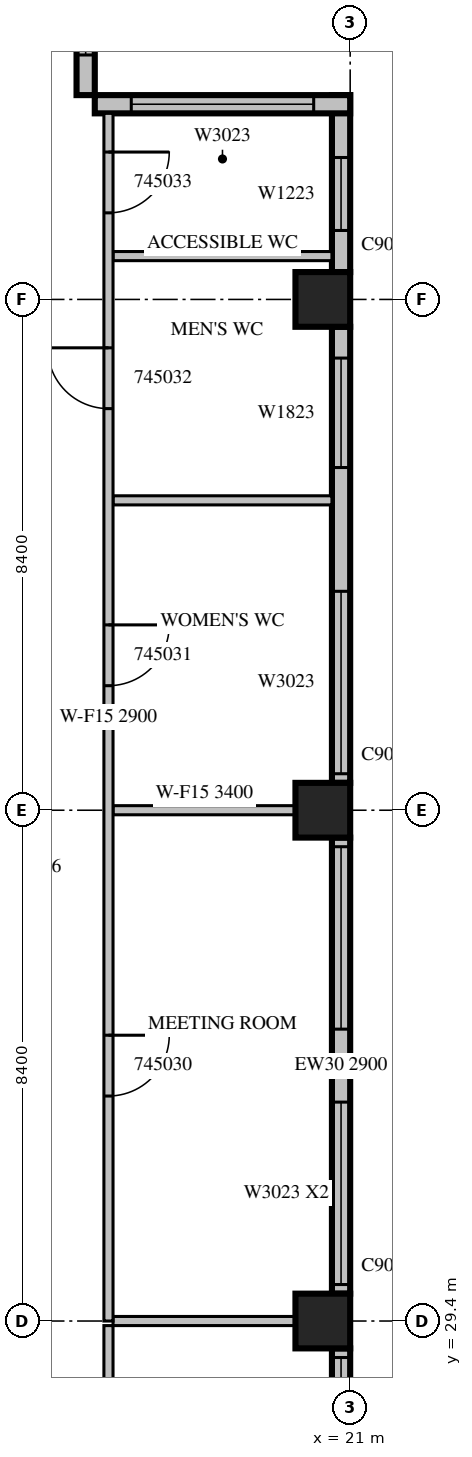
"""IFC4 building model, lengths in metres.
Left out: names, types, materials, properties, quantities, classifications, styles, units other than length and angle.
Written with IfcOpenShell. Run it as: python <this file> out.ifc"""

import sys

from ifc_helpers import new_model, si_unit, direction, frame, frame_2d, origin, origin_2d, place, context, subcontext, project, spatial, rectangle, extrude, source, transform, mapped, element, fill, save


model = new_model("IFC4")
c1 = context("Model", 3, precision=1e-05, world=origin(), true_north=direction((0.0, 1.0)))
c2 = subcontext(c1, "Body", "Model", "MODEL_VIEW")
j1 = project(units=[si_unit("LENGTHUNIT", "METRE"), si_unit("PLANEANGLEUNIT", "RADIAN")], contexts=[c1])
p1 = place(None, origin())
s1 = spatial("IfcSite", under=j1, at=p1, CompositionType="ELEMENT")
p2 = place(p1, origin())
s2 = spatial("IfcBuilding", under=s1, at=p2, CompositionType="ELEMENT")
p3 = place(p2, frame((0.0, 0.0, 204.4)))
s3 = spatial("IfcBuildingStorey", under=s2, at=p3, CompositionType="ELEMENT", Elevation=204.4)
m1 = source(origin(), c2, "Body", "SweptSolid", [
    extrude(rectangle(XDim=0.9, YDim=0.9, at=origin_2d()), origin(), (0.0, 0.0, 1.0), 3.8),
])
for number, where, z_axis, x_axis in (
    (1, (20.55, 29.4, 0.0), (0.0, 0.0, 1.0), (1.0, 0.0, 0.0)),
    (2, (20.55, 37.8, 0.0), (0.0, 0.0, 1.0), (1.0, 0.0, 0.0)),
    (3, (20.55, 46.2, 0.0), (0.0, 0.0, 1.0), (1.0, 0.0, 0.0)),
):
    element("IfcColumn", number, at=place(p3, frame(where, z_axis=z_axis, x_axis=x_axis)), inside=s3, PredefinedType="COLUMN", context=c2, shape_type="MappedRepresentation", body=[
        mapped(m1, transform((0.0, 0.0, 0.0), scale=1.0)),
    ])
m2 = source(origin(), c2, "Body", "SweptSolid", [
    extrude(rectangle(XDim=7.15, YDim=0.3, at=frame_2d((3.575, 0.0))), origin(), (0.0, 0.0, 1.0), 3.4),
])
p4 = place(p3, frame((20.85, 21.8, 0.0), z_axis=(0.0, 0.0, 1.0), x_axis=(0.0, 1.0, 0.0)))
e4 = element("IfcWall", 4, at=p4, inside=s3, PredefinedType="STANDARD", context=c2, shape_type="MappedRepresentation", body=[
    mapped(m2, transform((0.0, 0.0, 0.0), scale=1.0)),
])
m3 = source(origin(), c2, "Body", "SweptSolid", [
    extrude(rectangle(XDim=1.8, YDim=2.3, at=frame_2d((0.9, 1.15))), frame((0.0, 0.16, 0.0), z_axis=(0.0, -1.0, 0.0), x_axis=(1.0, 0.0, 0.0)), (0.0, 0.0, 1.0), 0.32),
])
p5 = place(p4, frame((0.4, 0.0, 0.6)))
e5 = element("IfcOpeningElement", 5, at=p5, cuts=e4, PredefinedType="OPENING", context=c2, shape_type="MappedRepresentation", body=[
    mapped(m3, transform((0.0, 0.0, 0.0), scale=1.0)),
])
m4 = source(origin(), c2, "Body", "SweptSolid", [
    extrude(rectangle(XDim=3.0, YDim=2.3, at=frame_2d((1.5, 1.15))), frame((0.0, 0.16, 0.0), z_axis=(0.0, -1.0, 0.0), x_axis=(1.0, 0.0, 0.0)), (0.0, 0.0, 1.0), 0.32),
])
p6 = place(p4, frame((4.0, 0.0, 0.6)))
e6 = element("IfcOpeningElement", 6, at=p6, cuts=e4, PredefinedType="OPENING", context=c2, shape_type="MappedRepresentation", body=[
    mapped(m4, transform((0.0, 0.0, 0.0), scale=1.0)),
])
m5 = source(origin(), c2, "Body", "SweptSolid", [
    extrude(rectangle(XDim=7.5, YDim=0.3, at=frame_2d((3.75, 0.0))), origin(), (0.0, 0.0, 1.0), 2.9),
])
p7 = place(p3, frame((20.85, 29.85, 0.0), z_axis=(0.0, 0.0, 1.0), x_axis=(0.0, 1.0, 0.0)))
e7 = element("IfcWall", 7, at=p7, inside=s3, PredefinedType="STANDARD", context=c2, shape_type="MappedRepresentation", body=[
    mapped(m5, transform((0.0, 0.0, 0.0), scale=1.0)),
])
p8 = place(p7, frame((0.15, 0.0, 0.6)))
e8 = element("IfcOpeningElement", 8, at=p8, cuts=e7, PredefinedType="OPENING", context=c2, shape_type="MappedRepresentation", body=[
    mapped(m4, transform((0.0, 0.0, 0.0), scale=1.0)),
])
p9 = place(p7, frame((4.35, 0.0, 0.6)))
e9 = element("IfcOpeningElement", 9, at=p9, cuts=e7, PredefinedType="OPENING", context=c2, shape_type="MappedRepresentation", body=[
    mapped(m4, transform((0.0, 0.0, 0.0), scale=1.0)),
])
m6 = source(origin(), c2, "Body", "SweptSolid", [
    extrude(rectangle(XDim=7.5, YDim=0.3, at=frame_2d((3.75, 0.0))), origin(), (0.0, 0.0, 1.0), 3.4),
])
p10 = place(p3, frame((20.85, 38.25, 0.0), z_axis=(0.0, 0.0, 1.0), x_axis=(0.0, 1.0, 0.0)))
e10 = element("IfcWall", 10, at=p10, inside=s3, PredefinedType="STANDARD", context=c2, shape_type="MappedRepresentation", body=[
    mapped(m6, transform((0.0, 0.0, 0.0), scale=1.0)),
])
p11 = place(p10, frame((0.15, 0.0, 0.6)))
e11 = element("IfcOpeningElement", 11, at=p11, cuts=e10, PredefinedType="OPENING", context=c2, shape_type="MappedRepresentation", body=[
    mapped(m4, transform((0.0, 0.0, 0.0), scale=1.0)),
])
p12 = place(p10, frame((5.186, 0.0, 0.6)))
e12 = element("IfcOpeningElement", 12, at=p12, cuts=e10, PredefinedType="OPENING", context=c2, shape_type="MappedRepresentation", body=[
    mapped(m3, transform((0.0, 0.0, 0.0), scale=1.0)),
])
m7 = source(origin(), c2, "Body", "SweptSolid", [
    extrude(rectangle(XDim=2.91, YDim=0.3, at=frame_2d((1.455, 0.0))), origin(), (0.0, 0.0, 1.0), 3.4),
])
p13 = place(p3, frame((20.85, 46.65, 0.0), z_axis=(0.0, 0.0, 1.0), x_axis=(0.0, 1.0, 0.0)))
e13 = element("IfcWall", 13, at=p13, inside=s3, PredefinedType="STANDARD", context=c2, shape_type="MappedRepresentation", body=[
    mapped(m7, transform((0.0, 0.0, 0.0), scale=1.0)),
])
m8 = source(origin(), c2, "Body", "SweptSolid", [
    extrude(rectangle(XDim=1.2, YDim=2.3, at=frame_2d((0.6, 1.15))), frame((0.0, 0.16, 0.0), z_axis=(0.0, -1.0, 0.0), x_axis=(1.0, 0.0, 0.0)), (0.0, 0.0, 1.0), 0.32),
])
p14 = place(p13, frame((0.684, 0.0, 0.6)))
e14 = element("IfcOpeningElement", 14, at=p14, cuts=e13, PredefinedType="OPENING", context=c2, shape_type="MappedRepresentation", body=[
    mapped(m8, transform((0.0, 0.0, 0.0), scale=1.0)),
])
m9 = source(origin(), c2, "Body", "SweptSolid", [
    extrude(rectangle(XDim=4.2, YDim=0.3, at=frame_2d((2.1, 0.0))), origin(), (0.0, 0.0, 1.0), 3.4),
])
p15 = place(p3, frame((21.0, 49.41, 0.0), z_axis=(0.0, 0.0, 1.0), x_axis=(-1.0, 0.0, 0.0)))
e15 = element("IfcWall", 15, at=p15, inside=s3, PredefinedType="STANDARD", context=c2, shape_type="MappedRepresentation", body=[
    mapped(m9, transform((0.0, 0.0, 0.0), scale=1.0)),
])
p16 = place(p15, frame((0.6, 0.0, 0.6)))
e16 = element("IfcOpeningElement", 16, at=p16, cuts=e15, PredefinedType="OPENING", context=c2, shape_type="MappedRepresentation", body=[
    mapped(m4, transform((0.0, 0.0, 0.0), scale=1.0)),
])
m10 = source(origin(), c2, "Body", "SweptSolid", [
    extrude(rectangle(XDim=2.52, YDim=0.3, at=frame_2d((1.26, 0.0))), origin(), (0.0, 0.0, 1.0), 3.4),
])
p17 = place(p3, frame((16.65, 49.56, 0.0), z_axis=(0.0, 0.0, 1.0), x_axis=(0.0, 1.0, 0.0)))
e17 = element("IfcWall", 17, at=p17, inside=s3, PredefinedType="STANDARD", context=c2, shape_type="MappedRepresentation", body=[
    mapped(m10, transform((0.0, 0.0, 0.0), scale=1.0)),
])
p18 = place(p17, frame((0.66, 0.0, 0.6)))
e18 = element("IfcOpeningElement", 18, at=p18, cuts=e17, PredefinedType="OPENING", context=c2, shape_type="MappedRepresentation", body=[
    mapped(m8, transform((0.0, 0.0, 0.0), scale=1.0)),
])
m11 = source(origin(), c2, "Body", "SweptSolid", [
    extrude(rectangle(XDim=4.85, YDim=0.15, at=frame_2d((2.425, 0.0))), origin(), (0.0, 0.0, 1.0), 3.4),
])
p19 = place(p3, frame((17.025, 29.325, 0.0), z_axis=(0.0, 0.0, 1.0), x_axis=(0.0, -1.0, 0.0)))
e19 = element("IfcWall", 19, at=p19, inside=s3, PredefinedType="PARTITIONING", context=c2, shape_type="MappedRepresentation", body=[
    mapped(m11, transform((0.0, 0.0, 0.0), scale=1.0)),
])
m12 = source(origin(), c2, "Body", "SweptSolid", [
    extrude(rectangle(XDim=3.001, YDim=0.15, at=frame_2d((1.5, 0.0))), origin(), (0.0, 0.0, 1.0), 3.4),
])
p20 = place(p3, frame((20.101, 29.4, 0.0), z_axis=(0.0, 0.0, 1.0), x_axis=(-1.0, 0.0, 0.0)))
e20 = element("IfcWall", 20, at=p20, inside=s3, PredefinedType="PARTITIONING", context=c2, shape_type="MappedRepresentation", body=[
    mapped(m12, transform((0.0, 0.0, 0.0), scale=1.0)),
])
m13 = source(origin(), c2, "Body", "SweptSolid", [
    extrude(rectangle(XDim=3.6, YDim=0.15, at=frame_2d((1.8, 0.0))), origin(), (0.0, 0.0, 1.0), 3.4),
])
for number, where, z_axis, x_axis in (
    (21, (17.1, 42.896, 0.0), (0.0, 0.0, 1.0), (1.0, 0.0, 0.0)),
    (22, (17.1, 46.913, 0.0), (0.0, 0.0, 1.0), (1.0, 0.0, 0.0)),
):
    element("IfcWall", number, at=place(p3, frame(where, z_axis=z_axis, x_axis=x_axis)), inside=s3, PredefinedType="PARTITIONING", context=c2, shape_type="MappedRepresentation", body=[
        mapped(m13, transform((0.0, 0.0, 0.0), scale=1.0)),
    ])
p21 = place(p3, frame((20.101, 37.8, 0.0), z_axis=(0.0, 0.0, 1.0), x_axis=(-1.0, 0.0, 0.0)))
e23 = element("IfcWall", 23, at=p21, inside=s3, PredefinedType="PARTITIONING", context=c2, shape_type="MappedRepresentation", body=[
    mapped(m12, transform((0.0, 0.0, 0.0), scale=1.0)),
])
m14 = source(origin(), c2, "Body", "SweptSolid", [
    extrude(rectangle(XDim=19.86, YDim=0.15, at=frame_2d((9.93, 0.0))), origin(), (0.0, 0.0, 1.0), 2.9),
])
p22 = place(p3, frame((17.025, 49.26, 0.0), z_axis=(0.0, 0.0, 1.0), x_axis=(0.0, -1.0, 0.0)))
e24 = element("IfcWall", 24, at=p22, inside=s3, PredefinedType="PARTITIONING", context=c2, shape_type="MappedRepresentation", body=[
    mapped(m14, transform((0.0, 0.0, 0.0), scale=1.0)),
])
m15 = source(origin(), c2, "Body", "SweptSolid", [
    extrude(rectangle(XDim=1.0, YDim=2.1, at=frame_2d((0.5, 1.05))), frame((0.0, 0.085, 0.0), z_axis=(0.0, -1.0, 0.0), x_axis=(1.0, 0.0, 0.0)), (0.0, 0.0, 1.0), 0.17),
])
p23 = place(p22, frame((15.16, 0.0, 0.0)))
e25 = element("IfcOpeningElement", 25, at=p23, cuts=e24, PredefinedType="OPENING", context=c2, shape_type="MappedRepresentation", body=[
    mapped(m15, transform((0.0, 0.0, 0.0), scale=1.0)),
])
p24 = place(p22, frame((8.412, 0.0, 0.0)))
e26 = element("IfcOpeningElement", 26, at=p24, cuts=e24, PredefinedType="OPENING", context=c2, shape_type="MappedRepresentation", body=[
    mapped(m15, transform((0.0, 0.0, 0.0), scale=1.0)),
])
p25 = place(p22, frame((3.856, 0.0, 0.0)))
e27 = element("IfcOpeningElement", 27, at=p25, cuts=e24, PredefinedType="OPENING", context=c2, shape_type="MappedRepresentation", body=[
    mapped(m15, transform((0.0, 0.0, 0.0), scale=1.0)),
])
p26 = place(p22, frame((0.636, 0.0, 0.0)))
e28 = element("IfcOpeningElement", 28, at=p26, cuts=e24, PredefinedType="OPENING", context=c2, shape_type="MappedRepresentation", body=[
    mapped(m15, transform((0.0, 0.0, 0.0), scale=1.0)),
])
m16 = source(origin(), c2, "Body", "SweptSolid", [
    extrude(rectangle(XDim=3.0, YDim=2.3, at=frame_2d((1.5, 1.15))), frame((0.0, 0.03, 0.0), z_axis=(0.0, -1.0, 0.0), x_axis=(1.0, 0.0, 0.0)), (0.0, 0.0, 1.0), 0.06),
])
p27 = place(p6, origin())
e29 = element("IfcWindow", 29, at=p27, inside=s3, PartitioningType="SINGLE_PANEL", PredefinedType="WINDOW", context=c2, shape_type="MappedRepresentation", body=[
    mapped(m16, transform((0.0, 0.0, 0.0), scale=1.0)),
])
fill(e6, e29)
p28 = place(p8, origin())
e30 = element("IfcWindow", 30, at=p28, inside=s3, PartitioningType="SINGLE_PANEL", PredefinedType="WINDOW", context=c2, shape_type="MappedRepresentation", body=[
    mapped(m16, transform((0.0, 0.0, 0.0), scale=1.0)),
])
fill(e8, e30)
p29 = place(p9, origin())
e31 = element("IfcWindow", 31, at=p29, inside=s3, PartitioningType="SINGLE_PANEL", PredefinedType="WINDOW", context=c2, shape_type="MappedRepresentation", body=[
    mapped(m16, transform((0.0, 0.0, 0.0), scale=1.0)),
])
fill(e9, e31)
p30 = place(p11, origin())
e32 = element("IfcWindow", 32, at=p30, inside=s3, PartitioningType="SINGLE_PANEL", PredefinedType="WINDOW", context=c2, shape_type="MappedRepresentation", body=[
    mapped(m16, transform((0.0, 0.0, 0.0), scale=1.0)),
])
fill(e11, e32)
m17 = source(origin(), c2, "Body", "SweptSolid", [
    extrude(rectangle(XDim=1.8, YDim=2.3, at=frame_2d((0.9, 1.15))), frame((0.0, 0.03, 0.0), z_axis=(0.0, -1.0, 0.0), x_axis=(1.0, 0.0, 0.0)), (0.0, 0.0, 1.0), 0.06),
])
p31 = place(p12, origin())
e33 = element("IfcWindow", 33, at=p31, inside=s3, PartitioningType="SINGLE_PANEL", PredefinedType="WINDOW", context=c2, shape_type="MappedRepresentation", body=[
    mapped(m17, transform((0.0, 0.0, 0.0), scale=1.0)),
])
fill(e12, e33)
m18 = source(origin(), c2, "Body", "SweptSolid", [
    extrude(rectangle(XDim=1.2, YDim=2.3, at=frame_2d((0.6, 1.15))), frame((0.0, 0.03, 0.0), z_axis=(0.0, -1.0, 0.0), x_axis=(1.0, 0.0, 0.0)), (0.0, 0.0, 1.0), 0.06),
])
p32 = place(p14, origin())
e34 = element("IfcWindow", 34, at=p32, inside=s3, PartitioningType="SINGLE_PANEL", PredefinedType="WINDOW", context=c2, shape_type="MappedRepresentation", body=[
    mapped(m18, transform((0.0, 0.0, 0.0), scale=1.0)),
])
fill(e14, e34)
p33 = place(p16, origin())
e35 = element("IfcWindow", 35, at=p33, inside=s3, PartitioningType="SINGLE_PANEL", PredefinedType="WINDOW", context=c2, shape_type="MappedRepresentation", body=[
    mapped(m16, transform((0.0, 0.0, 0.0), scale=1.0)),
])
fill(e16, e35)
p34 = place(p18, origin())
e36 = element("IfcWindow", 36, at=p34, inside=s3, PartitioningType="SINGLE_PANEL", PredefinedType="WINDOW", context=c2, shape_type="MappedRepresentation", body=[
    mapped(m18, transform((0.0, 0.0, 0.0), scale=1.0)),
])
fill(e18, e36)
m19 = source(origin(), c2, "Body", "SweptSolid", [
    extrude(rectangle(XDim=1.0, YDim=2.1, at=frame_2d((0.5, 1.05))), frame((0.0, 0.025, 0.0), z_axis=(0.0, -1.0, 0.0), x_axis=(1.0, 0.0, 0.0)), (0.0, 0.0, 1.0), 0.05),
])
p35 = place(p23, origin())
e37 = element("IfcDoor", 37, at=p35, inside=s3, OperationType="SINGLE_SWING_LEFT", PredefinedType="DOOR", context=c2, shape_type="MappedRepresentation", body=[
    mapped(m19, transform((0.0, 0.0, 0.0), scale=1.0)),
])
fill(e25, e37)
p36 = place(p24, origin())
e38 = element("IfcDoor", 38, at=p36, inside=s3, OperationType="SINGLE_SWING_LEFT", PredefinedType="DOOR", context=c2, shape_type="MappedRepresentation", body=[
    mapped(m19, transform((0.0, 0.0, 0.0), scale=1.0)),
])
fill(e26, e38)
p37 = place(p25, origin())
e39 = element("IfcDoor", 39, at=p37, inside=s3, OperationType="SINGLE_SWING_RIGHT", PredefinedType="DOOR", context=c2, shape_type="MappedRepresentation", body=[
    mapped(m19, transform((0.0, 0.0, 0.0), scale=1.0)),
])
fill(e27, e39)
p38 = place(p26, origin())
e40 = element("IfcDoor", 40, at=p38, inside=s3, OperationType="SINGLE_SWING_LEFT", PredefinedType="DOOR", context=c2, shape_type="MappedRepresentation", body=[
    mapped(m19, transform((0.0, 0.0, 0.0), scale=1.0)),
])
fill(e28, e40)
save(model, sys.argv[1])
